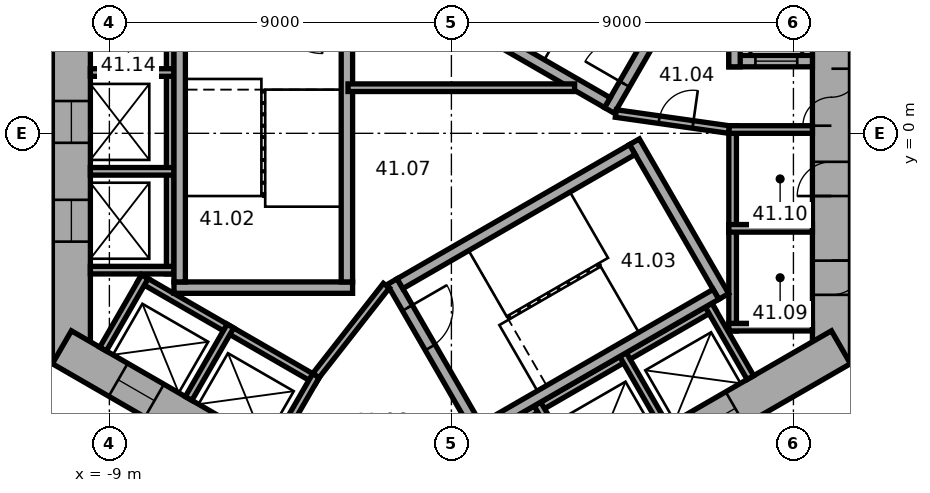
"""IFC4 building model, lengths in metres.
Left out: names, types, materials, properties, quantities, classifications, styles, units other than length and angle.
Written with IfcOpenShell. Run it as: python <this file> out.ifc"""

import sys

from ifc_helpers import new_model, si_unit, direction, frame, frame_2d, origin, place, context, subcontext, project, spatial, rectangle, extrude, element, fill, save


model = new_model("IFC4")
c1 = context("Model", 3, precision=1e-05, world=origin(), true_north=direction((0.0, 1.0)))
c2 = subcontext(c1, "Body", "Model", "MODEL_VIEW")
j1 = project(units=[si_unit("LENGTHUNIT", "METRE"), si_unit("PLANEANGLEUNIT", "RADIAN")], contexts=[c1])
p1 = place(None, origin())
s1 = spatial("IfcSite", under=j1, at=p1, CompositionType="ELEMENT")
p2 = place(p1, origin())
s2 = spatial("IfcBuilding", under=s1, at=p2, CompositionType="ELEMENT")
p3 = place(p2, frame((0.0, 0.0, 168.8)))
s3 = spatial("IfcBuildingStorey", under=s2, at=p3, CompositionType="ELEMENT", Elevation=168.8)
p4 = place(p3, frame((10.0, -6.062, 0.0), z_axis=(0.0, 0.0, 1.0), x_axis=(0.0, 1.0, 0.0)))
e1 = element("IfcWall", 1, at=p4, inside=s3, PredefinedType="SHEAR", context=c2, shape_type="SweptSolid", body=[
    extrude(rectangle(XDim=12.125, YDim=1.0, at=frame_2d((6.062, 0.0))), origin(), (0.0, 0.0, 1.0), 3.7),
])
p5 = place(p4, frame((6.262, 0.0, 0.0)))
e2 = element("IfcOpeningElement", 2, at=p5, cuts=e1, PredefinedType="OPENING", context=c2, shape_type="SweptSolid", body=[
    extrude(rectangle(XDim=1.5, YDim=2.1, at=frame_2d((0.75, 1.05))), frame((0.0, 0.51, 0.0), z_axis=(0.0, -1.0, 0.0), x_axis=(1.0, 0.0, 0.0)), (0.0, 0.0, 1.0), 1.02),
])
p6 = place(p4, frame((1.812, 0.0, 0.0)))
e3 = element("IfcOpeningElement", 3, at=p6, cuts=e1, PredefinedType="OPENING", context=c2, shape_type="SweptSolid", body=[
    extrude(rectangle(XDim=0.9, YDim=2.1, at=frame_2d((0.45, 1.05))), frame((0.0, 0.51, 0.0), z_axis=(0.0, -1.0, 0.0), x_axis=(1.0, 0.0, 0.0)), (0.0, 0.0, 1.0), 1.02),
])
p7 = place(p4, frame((4.412, 0.0, 0.0)))
e4 = element("IfcOpeningElement", 4, at=p7, cuts=e1, PredefinedType="OPENING", context=c2, shape_type="SweptSolid", body=[
    extrude(rectangle(XDim=0.9, YDim=2.1, at=frame_2d((0.45, 1.05))), frame((0.0, 0.51, 0.0), z_axis=(0.0, -1.0, 0.0), x_axis=(1.0, 0.0, 0.0)), (0.0, 0.0, 1.0), 1.02),
])
p8 = place(p3, frame((-10.0, 6.062, 0.0), z_axis=(0.0, 0.0, 1.0), x_axis=(0.0, -1.0, 0.0)))
e5 = element("IfcWall", 5, at=p8, inside=s3, PredefinedType="SHEAR", context=c2, shape_type="SweptSolid", body=[
    extrude(rectangle(XDim=12.125, YDim=1.0, at=frame_2d((6.062, 0.0))), origin(), (0.0, 0.0, 1.0), 3.7),
])
p9 = place(p8, frame((5.212, 0.0, 0.0)))
e6 = element("IfcOpeningElement", 6, at=p9, cuts=e5, PredefinedType="OPENING", context=c2, shape_type="SweptSolid", body=[
    extrude(rectangle(XDim=1.1, YDim=2.1, at=frame_2d((0.55, 1.05))), frame((0.0, 0.51, 0.0), z_axis=(0.0, -1.0, 0.0), x_axis=(1.0, 0.0, 0.0)), (0.0, 0.0, 1.0), 1.02),
])
p10 = place(p8, frame((7.812, 0.0, 0.0)))
e7 = element("IfcOpeningElement", 7, at=p10, cuts=e5, PredefinedType="OPENING", context=c2, shape_type="SweptSolid", body=[
    extrude(rectangle(XDim=1.1, YDim=2.1, at=frame_2d((0.55, 1.05))), frame((0.0, 0.51, 0.0), z_axis=(0.0, -1.0, 0.0), x_axis=(1.0, 0.0, 0.0)), (0.0, 0.0, 1.0), 1.02),
])
p11 = place(p3, frame((-10.25, -5.629, 0.0), z_axis=(0.0, 0.0, 1.0), x_axis=(0.866022616891, -0.50000482701, 0.0)))
e8 = element("IfcWall", 8, at=p11, inside=s3, PredefinedType="SHEAR", context=c2, shape_type="SweptSolid", body=[
    extrude(rectangle(XDim=12.125, YDim=1.0, at=frame_2d((6.062, 0.0))), origin(), (0.0, 0.0, 1.0), 3.7),
])
p12 = place(p11, frame((6.262, 0.0, 0.0)))
e9 = element("IfcOpeningElement", 9, at=p12, cuts=e8, PredefinedType="OPENING", context=c2, shape_type="SweptSolid", body=[
    extrude(rectangle(XDim=1.5, YDim=2.1, at=frame_2d((0.75, 1.05))), frame((0.0, 0.51, 0.0), z_axis=(0.0, -1.0, 0.0), x_axis=(1.0, 0.0, 0.0)), (0.0, 0.0, 1.0), 1.02),
])
p13 = place(p11, frame((1.712, 0.0, 0.0)))
e10 = element("IfcOpeningElement", 10, at=p13, cuts=e8, PredefinedType="OPENING", context=c2, shape_type="SweptSolid", body=[
    extrude(rectangle(XDim=1.1, YDim=2.1, at=frame_2d((0.55, 1.05))), frame((0.0, 0.51, 0.0), z_axis=(0.0, -1.0, 0.0), x_axis=(1.0, 0.0, 0.0)), (0.0, 0.0, 1.0), 1.02),
])
p14 = place(p11, frame((4.312, 0.0, 0.0)))
e11 = element("IfcOpeningElement", 11, at=p14, cuts=e8, PredefinedType="OPENING", context=c2, shape_type="SweptSolid", body=[
    extrude(rectangle(XDim=1.1, YDim=2.1, at=frame_2d((0.55, 1.05))), frame((0.0, 0.51, 0.0), z_axis=(0.0, -1.0, 0.0), x_axis=(1.0, 0.0, 0.0)), (0.0, 0.0, 1.0), 1.02),
])
p15 = place(p3, frame((-0.25, -11.691, 0.0), z_axis=(0.0, 0.0, 1.0), x_axis=(0.866022616891, 0.50000482701, 0.0)))
e12 = element("IfcWall", 12, at=p15, inside=s3, PredefinedType="SHEAR", context=c2, shape_type="SweptSolid", body=[
    extrude(rectangle(XDim=12.125, YDim=1.0, at=frame_2d((6.062, 0.0))), origin(), (0.0, 0.0, 1.0), 3.7),
])
p16 = place(p15, frame((2.612, 0.0, 0.0)))
e13 = element("IfcOpeningElement", 13, at=p16, cuts=e12, PredefinedType="OPENING", context=c2, shape_type="SweptSolid", body=[
    extrude(rectangle(XDim=1.1, YDim=2.1, at=frame_2d((0.55, 1.05))), frame((0.0, 0.51, 0.0), z_axis=(0.0, -1.0, 0.0), x_axis=(1.0, 0.0, 0.0)), (0.0, 0.0, 1.0), 1.02),
])
p17 = place(p15, frame((5.212, 0.0, 0.0)))
e14 = element("IfcOpeningElement", 14, at=p17, cuts=e12, PredefinedType="OPENING", context=c2, shape_type="SweptSolid", body=[
    extrude(rectangle(XDim=1.1, YDim=2.1, at=frame_2d((0.55, 1.05))), frame((0.0, 0.51, 0.0), z_axis=(0.0, -1.0, 0.0), x_axis=(1.0, 0.0, 0.0)), (0.0, 0.0, 1.0), 1.02),
])
p18 = place(p15, frame((7.812, 0.0, 0.0)))
e15 = element("IfcOpeningElement", 15, at=p18, cuts=e12, PredefinedType="OPENING", context=c2, shape_type="SweptSolid", body=[
    extrude(rectangle(XDim=1.1, YDim=2.1, at=frame_2d((0.55, 1.05))), frame((0.0, 0.51, 0.0), z_axis=(0.0, -1.0, 0.0), x_axis=(1.0, 0.0, 0.0)), (0.0, 0.0, 1.0), 1.02),
])
p19 = place(p3, frame((7.4, -5.2, 0.0), z_axis=(0.0, 0.0, 1.0), x_axis=(0.0, 1.0, 0.0)))
e16 = element("IfcWall", 16, at=p19, inside=s3, PredefinedType="PARTITIONING", context=c2, shape_type="SweptSolid", body=[
    extrude(rectangle(XDim=5.4, YDim=0.2, at=frame_2d((2.7, 0.0))), origin(), (0.0, 0.0, 1.0), 3.42),
])
for number, where, z_axis, x_axis in (
    (17, (7.3, -5.1, 0.0), (0.0, 0.0, 1.0), (1.0, 0.0, 0.0)),
    (18, (7.3, -2.5, 0.0), (0.0, 0.0, 1.0), (1.0, 0.0, 0.0)),
    (19, (7.3, 0.1, 0.0), (0.0, 0.0, 1.0), (1.0, 0.0, 0.0)),
):
    element("IfcWall", number, at=place(p3, frame(where, z_axis=z_axis, x_axis=x_axis)), inside=s3, PredefinedType="PARTITIONING", context=c2, shape_type="SweptSolid", body=[
        extrude(rectangle(XDim=2.2, YDim=0.2, at=frame_2d((1.1, 0.0))), origin(), (0.0, 0.0, 1.0), 3.42),
    ])
p20 = place(p3, frame((-7.4, 4.3, 0.0), z_axis=(0.0, 0.0, 1.0), x_axis=(0.0, -1.0, 0.0)))
e20 = element("IfcWall", 20, at=p20, inside=s3, PredefinedType="PARTITIONING", context=c2, shape_type="SweptSolid", body=[
    extrude(rectangle(XDim=8.0, YDim=0.2, at=frame_2d((4.0, 0.0))), origin(), (0.0, 0.0, 1.0), 3.42),
])
for number, where, z_axis, x_axis in (
    (21, (-7.3, 1.6, 0.0), (0.0, 0.0, 1.0), (-1.0, 0.0, 0.0)),
    (22, (-7.3, -1.0, 0.0), (0.0, 0.0, 1.0), (-1.0, 0.0, 0.0)),
    (23, (-7.3, -3.6, 0.0), (0.0, 0.0, 1.0), (-1.0, 0.0, 0.0)),
):
    element("IfcWall", number, at=place(p3, frame(where, z_axis=z_axis, x_axis=x_axis)), inside=s3, PredefinedType="PARTITIONING", context=c2, shape_type="SweptSolid", body=[
        extrude(rectangle(XDim=2.2, YDim=0.2, at=frame_2d((1.1, 0.0))), origin(), (0.0, 0.0, 1.0), 3.42),
    ])
p21 = place(p3, frame((-8.203, -3.809, 0.0), z_axis=(0.0, 0.0, 1.0), x_axis=(0.866028230842, -0.499995103361, 0.0)))
e24 = element("IfcWall", 24, at=p21, inside=s3, PredefinedType="PARTITIONING", context=c2, shape_type="SweptSolid", body=[
    extrude(rectangle(XDim=5.4, YDim=0.2, at=frame_2d((2.7, 0.0))), origin(), (0.0, 0.0, 1.0), 3.42),
])
for number, where, z_axis, x_axis in (
    (25, (-8.067, -3.772, 0.0), (0.0, 0.0, 1.0), (-0.5, -0.866, 0.0)),
    (26, (-5.815, -5.072, 0.0), (0.0, 0.0, 1.0), (-0.5, -0.866, 0.0)),
):
    element("IfcWall", number, at=place(p3, frame(where, z_axis=z_axis, x_axis=x_axis)), inside=s3, PredefinedType="PARTITIONING", context=c2, shape_type="SweptSolid", body=[
        extrude(rectangle(XDim=2.2, YDim=0.2, at=frame_2d((1.1, 0.0))), origin(), (0.0, 0.0, 1.0), 3.42),
    ])
p22 = place(p3, frame((-3.563, -6.372, 0.0), z_axis=(0.0, 0.0, 1.0), x_axis=(-0.499994660107, -0.866028486751, 0.0)))
e27 = element("IfcWall", 27, at=p22, inside=s3, PredefinedType="PARTITIONING", context=c2, shape_type="SweptSolid", body=[
    extrude(rectangle(XDim=2.2, YDim=0.2, at=frame_2d((1.1, 0.0))), origin(), (0.0, 0.0, 1.0), 3.42),
])
p23 = place(p3, frame((-0.024, -8.559, 0.0), z_axis=(0.0, 0.0, 1.0), x_axis=(0.866026010844, 0.49999894854, 0.0)))
e28 = element("IfcWall", 28, at=p23, inside=s3, PredefinedType="PARTITIONING", context=c2, shape_type="SweptSolid", body=[
    extrude(rectangle(XDim=8.0, YDim=0.2, at=frame_2d((4.0, 0.0))), origin(), (0.0, 0.0, 1.0), 3.42),
])
for number, where, z_axis, x_axis in (
    (29, (2.264, -7.122, 0.0), (0.0, 0.0, 1.0), (0.5, -0.866, 0.0)),
    (30, (4.516, -5.822, 0.0), (0.0, 0.0, 1.0), (0.5, -0.866, 0.0)),
    (31, (6.768, -4.522, 0.0), (0.0, 0.0, 1.0), (0.5, -0.866, 0.0)),
):
    element("IfcWall", number, at=place(p3, frame(where, z_axis=z_axis, x_axis=x_axis)), inside=s3, PredefinedType="PARTITIONING", context=c2, shape_type="SweptSolid", body=[
        extrude(rectangle(XDim=2.2, YDim=0.2, at=frame_2d((1.1, 0.0))), origin(), (0.0, 0.0, 1.0), 3.42),
    ])
p24 = place(p3, frame((4.158, 0.602, 0.0), z_axis=(0.0, 0.0, 1.0), x_axis=(0.499977259774, 0.866038532462, 0.0)))
e32 = element("IfcWall", 32, at=p24, inside=s3, PredefinedType="SHEAR", context=c2, shape_type="SweptSolid", body=[
    extrude(rectangle(XDim=4.7, YDim=0.3, at=frame_2d((2.35, 0.0))), origin(), (0.0, 0.0, 1.0), 3.42),
])
p25 = place(p24, frame((0.8, 0.0, 0.0)))
e33 = element("IfcOpeningElement", 33, at=p25, cuts=e32, PredefinedType="OPENING", context=c2, shape_type="SweptSolid", body=[
    extrude(rectangle(XDim=1.2, YDim=2.1, at=frame_2d((0.6, 1.05))), frame((0.0, 0.16, 0.0), z_axis=(0.0, -1.0, 0.0), x_axis=(1.0, 0.0, 0.0)), (0.0, 0.0, 1.0), 0.32),
])
p26 = place(p3, frame((4.103, 0.807, 0.0), z_axis=(0.0, 0.0, 1.0), x_axis=(-0.866027801685, 0.499995846692, 0.0)))
e34 = element("IfcWall", 34, at=p26, inside=s3, PredefinedType="SHEAR", context=c2, shape_type="SweptSolid", body=[
    extrude(rectangle(XDim=7.06, YDim=0.3, at=frame_2d((3.53, 0.0))), origin(), (0.0, 0.0, 1.0), 3.42),
])
p27 = place(p3, frame((-2.6, -4.06, 0.0), z_axis=(0.0, 0.0, 1.0), x_axis=(-1.0, 0.0, 0.0)))
e35 = element("IfcWall", 35, at=p27, inside=s3, PredefinedType="SHEAR", context=c2, shape_type="SweptSolid", body=[
    extrude(rectangle(XDim=4.7, YDim=0.3, at=frame_2d((2.35, 0.0))), origin(), (0.0, 0.0, 1.0), 3.42),
])
for number, where, z_axis, x_axis in (
    (36, (-2.75, 3.15, 0.0), (0.0, 0.0, 1.0), (0.0, -1.0, 0.0)),
    (37, (-7.15, 3.15, 0.0), (0.0, 0.0, 1.0), (0.0, -1.0, 0.0)),
):
    element("IfcWall", number, at=place(p3, frame(where, z_axis=z_axis, x_axis=x_axis)), inside=s3, PredefinedType="SHEAR", context=c2, shape_type="SweptSolid", body=[
        extrude(rectangle(XDim=7.06, YDim=0.3, at=frame_2d((3.53, 0.0))), origin(), (0.0, 0.0, 1.0), 3.42),
    ])
p28 = place(p3, frame((-1.558, -3.902, 0.0), z_axis=(0.0, 0.0, 1.0), x_axis=(0.499977259774, -0.866038532462, 0.0)))
e38 = element("IfcWall", 38, at=p28, inside=s3, PredefinedType="SHEAR", context=c2, shape_type="SweptSolid", body=[
    extrude(rectangle(XDim=4.7, YDim=0.3, at=frame_2d((2.35, 0.0))), origin(), (0.0, 0.0, 1.0), 3.42),
])
p29 = place(p28, frame((0.8, 0.0, 0.0)))
e39 = element("IfcOpeningElement", 39, at=p29, cuts=e38, PredefinedType="OPENING", context=c2, shape_type="SweptSolid", body=[
    extrude(rectangle(XDim=1.2, YDim=2.1, at=frame_2d((0.6, 1.05))), frame((0.0, 0.16, 0.0), z_axis=(0.0, -1.0, 0.0), x_axis=(1.0, 0.0, 0.0)), (0.0, 0.0, 1.0), 0.32),
])
p30 = place(p3, frame((4.816, -0.222, 0.0), z_axis=(0.0, 0.0, 1.0), x_axis=(0.499977259774, -0.866038532462, 0.0)))
e40 = element("IfcWall", 40, at=p30, inside=s3, PredefinedType="SHEAR", context=c2, shape_type="SweptSolid", body=[
    extrude(rectangle(XDim=4.7, YDim=0.3, at=frame_2d((2.35, 0.0))), origin(), (0.0, 0.0, 1.0), 3.42),
])
for number, where, z_axis, x_axis in (
    (41, (-1.353, -3.957, 0.0), (0.0, 0.0, 1.0), (0.866, 0.5, 0.0)),
    (42, (0.847, -7.767, 0.0), (0.0, 0.0, 1.0), (0.866, 0.5, 0.0)),
):
    element("IfcWall", number, at=place(p3, frame(where, z_axis=z_axis, x_axis=x_axis)), inside=s3, PredefinedType="SHEAR", context=c2, shape_type="SweptSolid", body=[
        extrude(rectangle(XDim=7.06, YDim=0.3, at=frame_2d((3.53, 0.0))), origin(), (0.0, 0.0, 1.0), 3.42),
    ])
p31 = place(p3, frame((7.3, 1.9, 0.0), z_axis=(0.0, 0.0, 1.0), x_axis=(1.0, 0.0, 0.0)))
e43 = element("IfcWall", 43, at=p31, inside=s3, PredefinedType="SHEAR", context=c2, shape_type="SweptSolid", body=[
    extrude(rectangle(XDim=2.2, YDim=0.3, at=frame_2d((1.1, 0.0))), origin(), (0.0, 0.0, 1.0), 3.42),
])
p32 = place(p31, frame((0.7, 0.0, 0.0)))
e44 = element("IfcOpeningElement", 44, at=p32, cuts=e43, PredefinedType="OPENING", context=c2, shape_type="SweptSolid", body=[
    extrude(rectangle(XDim=1.1, YDim=2.1, at=frame_2d((0.55, 1.05))), frame((0.0, 0.16, 0.0), z_axis=(0.0, -1.0, 0.0), x_axis=(1.0, 0.0, 0.0)), (0.0, 0.0, 1.0), 0.32),
])
p33 = place(p3, frame((7.45, 1.75, 0.0), z_axis=(0.0, 0.0, 1.0), x_axis=(0.0, 1.0, 0.0)))
e45 = element("IfcWall", 45, at=p33, inside=s3, PredefinedType="SHEAR", context=c2, shape_type="SweptSolid", body=[
    extrude(rectangle(XDim=3.35, YDim=0.3, at=frame_2d((1.675, 0.0))), origin(), (0.0, 0.0, 1.0), 3.42),
])
p34 = place(p3, frame((4.327, 0.521, 0.0), z_axis=(0.0, 0.0, 1.0), x_axis=(0.990124376366, -0.14019172346, 0.0)))
e46 = element("IfcWall", 46, at=p34, inside=s3, PredefinedType="PARTITIONING", context=c2, shape_type="SweptSolid", body=[
    extrude(rectangle(XDim=3.002, YDim=0.2, at=frame_2d((1.501, 0.0))), origin(), (0.0, 0.0, 1.0), 3.42),
])
p35 = place(p34, frame((1.15, 0.0, 0.0)))
e47 = element("IfcOpeningElement", 47, at=p35, cuts=e46, PredefinedType="OPENING", context=c2, shape_type="SweptSolid", body=[
    extrude(rectangle(XDim=0.9, YDim=2.1, at=frame_2d((0.45, 1.05))), frame((0.0, 0.11, 0.0), z_axis=(0.0, -1.0, 0.0), x_axis=(1.0, 0.0, 0.0)), (0.0, 0.0, 1.0), 0.22),
])
p36 = place(p3, frame((-1.712, -4.008, 0.0), z_axis=(0.0, 0.0, 1.0), x_axis=(-0.616549420702, -0.787316208287, 0.0)))
e48 = element("IfcWall", 48, at=p36, inside=s3, PredefinedType="PARTITIONING", context=c2, shape_type="SweptSolid", body=[
    extrude(rectangle(XDim=3.002, YDim=0.2, at=frame_2d((1.501, 0.0))), origin(), (0.0, 0.0, 1.0), 3.42),
])
p37 = place(p3, frame((-2.72, 1.2, 0.0), z_axis=(0.0, 0.0, 1.0), x_axis=(1.0, 0.0, 0.0)))
e49 = element("IfcWall", 49, at=p37, inside=s3, PredefinedType="PARTITIONING", context=c2, shape_type="SweptSolid", body=[
    extrude(rectangle(XDim=5.961, YDim=0.2, at=frame_2d((2.981, 0.0))), origin(), (0.0, 0.0, 1.0), 3.42),
])
p38 = place(p5, origin())
e50 = element("IfcDoor", 50, at=p38, inside=s3, OperationType="DOUBLE_DOOR_SINGLE_SWING", PredefinedType="DOOR", context=c2, shape_type="SweptSolid", body=[
    extrude(rectangle(XDim=1.5, YDim=2.1, at=frame_2d((0.75, 1.05))), frame((0.0, 0.025, 0.0), z_axis=(0.0, -1.0, 0.0), x_axis=(1.0, 0.0, 0.0)), (0.0, 0.0, 1.0), 0.05),
])
fill(e2, e50)
p39 = place(p25, origin())
e51 = element("IfcDoor", 51, at=p39, inside=s3, OperationType="SINGLE_SWING_RIGHT", PredefinedType="DOOR", context=c2, shape_type="SweptSolid", body=[
    extrude(rectangle(XDim=1.2, YDim=2.1, at=frame_2d((0.6, 1.05))), frame((0.0, 0.025, 0.0), z_axis=(0.0, -1.0, 0.0), x_axis=(1.0, 0.0, 0.0)), (0.0, 0.0, 1.0), 0.05),
])
fill(e33, e51)
p40 = place(p29, origin())
e52 = element("IfcDoor", 52, at=p40, inside=s3, OperationType="SINGLE_SWING_RIGHT", PredefinedType="DOOR", context=c2, shape_type="SweptSolid", body=[
    extrude(rectangle(XDim=1.2, YDim=2.1, at=frame_2d((0.6, 1.05))), frame((0.0, 0.025, 0.0), z_axis=(0.0, -1.0, 0.0), x_axis=(1.0, 0.0, 0.0)), (0.0, 0.0, 1.0), 0.05),
])
fill(e39, e52)
p41 = place(p35, origin())
e53 = element("IfcDoor", 53, at=p41, inside=s3, OperationType="SINGLE_SWING_LEFT", PredefinedType="DOOR", context=c2, shape_type="SweptSolid", body=[
    extrude(rectangle(XDim=0.9, YDim=2.1, at=frame_2d((0.45, 1.05))), frame((0.0, 0.025, 0.0), z_axis=(0.0, -1.0, 0.0), x_axis=(1.0, 0.0, 0.0)), (0.0, 0.0, 1.0), 0.05),
])
fill(e47, e53)
p42 = place(p6, origin())
e54 = element("IfcDoor", 54, at=p42, inside=s3, OperationType="SINGLE_SWING_LEFT", PredefinedType="DOOR", context=c2, shape_type="SweptSolid", body=[
    extrude(rectangle(XDim=0.9, YDim=2.1, at=frame_2d((0.45, 1.05))), frame((0.0, 0.025, 0.0), z_axis=(0.0, -1.0, 0.0), x_axis=(1.0, 0.0, 0.0)), (0.0, 0.0, 1.0), 0.05),
])
fill(e3, e54)
p43 = place(p7, origin())
e55 = element("IfcDoor", 55, at=p43, inside=s3, OperationType="SINGLE_SWING_LEFT", PredefinedType="DOOR", context=c2, shape_type="SweptSolid", body=[
    extrude(rectangle(XDim=0.9, YDim=2.1, at=frame_2d((0.45, 1.05))), frame((0.0, 0.025, 0.0), z_axis=(0.0, -1.0, 0.0), x_axis=(1.0, 0.0, 0.0)), (0.0, 0.0, 1.0), 0.05),
])
fill(e4, e55)
p44 = place(p32, origin())
e56 = element("IfcDoor", 56, at=p44, inside=s3, OperationType="DOUBLE_DOOR_SLIDING", PredefinedType="DOOR", context=c2, shape_type="SweptSolid", body=[
    extrude(rectangle(XDim=1.1, YDim=2.1, at=frame_2d((0.55, 1.05))), frame((0.0, 0.025, 0.0), z_axis=(0.0, -1.0, 0.0), x_axis=(1.0, 0.0, 0.0)), (0.0, 0.0, 1.0), 0.05),
])
fill(e44, e56)
p45 = place(p9, origin())
e57 = element("IfcDoor", 57, at=p45, inside=s3, OperationType="DOUBLE_DOOR_SLIDING", PredefinedType="DOOR", context=c2, shape_type="SweptSolid", body=[
    extrude(rectangle(XDim=1.1, YDim=2.1, at=frame_2d((0.55, 1.05))), frame((0.0, 0.025, 0.0), z_axis=(0.0, -1.0, 0.0), x_axis=(1.0, 0.0, 0.0)), (0.0, 0.0, 1.0), 0.05),
])
fill(e6, e57)
p46 = place(p10, origin())
e58 = element("IfcDoor", 58, at=p46, inside=s3, OperationType="DOUBLE_DOOR_SLIDING", PredefinedType="DOOR", context=c2, shape_type="SweptSolid", body=[
    extrude(rectangle(XDim=1.1, YDim=2.1, at=frame_2d((0.55, 1.05))), frame((0.0, 0.025, 0.0), z_axis=(0.0, -1.0, 0.0), x_axis=(1.0, 0.0, 0.0)), (0.0, 0.0, 1.0), 0.05),
])
fill(e7, e58)
p47 = place(p13, origin())
e59 = element("IfcDoor", 59, at=p47, inside=s3, OperationType="DOUBLE_DOOR_SLIDING", PredefinedType="DOOR", context=c2, shape_type="SweptSolid", body=[
    extrude(rectangle(XDim=1.1, YDim=2.1, at=frame_2d((0.55, 1.05))), frame((0.0, 0.025, 0.0), z_axis=(0.0, -1.0, 0.0), x_axis=(1.0, 0.0, 0.0)), (0.0, 0.0, 1.0), 0.05),
])
fill(e10, e59)
p48 = place(p18, origin())
e60 = element("IfcDoor", 60, at=p48, inside=s3, OperationType="DOUBLE_DOOR_SLIDING", PredefinedType="DOOR", context=c2, shape_type="SweptSolid", body=[
    extrude(rectangle(XDim=1.1, YDim=2.1, at=frame_2d((0.55, 1.05))), frame((0.0, 0.025, 0.0), z_axis=(0.0, -1.0, 0.0), x_axis=(1.0, 0.0, 0.0)), (0.0, 0.0, 1.0), 0.05),
])
fill(e15, e60)
save(model, sys.argv[1])
